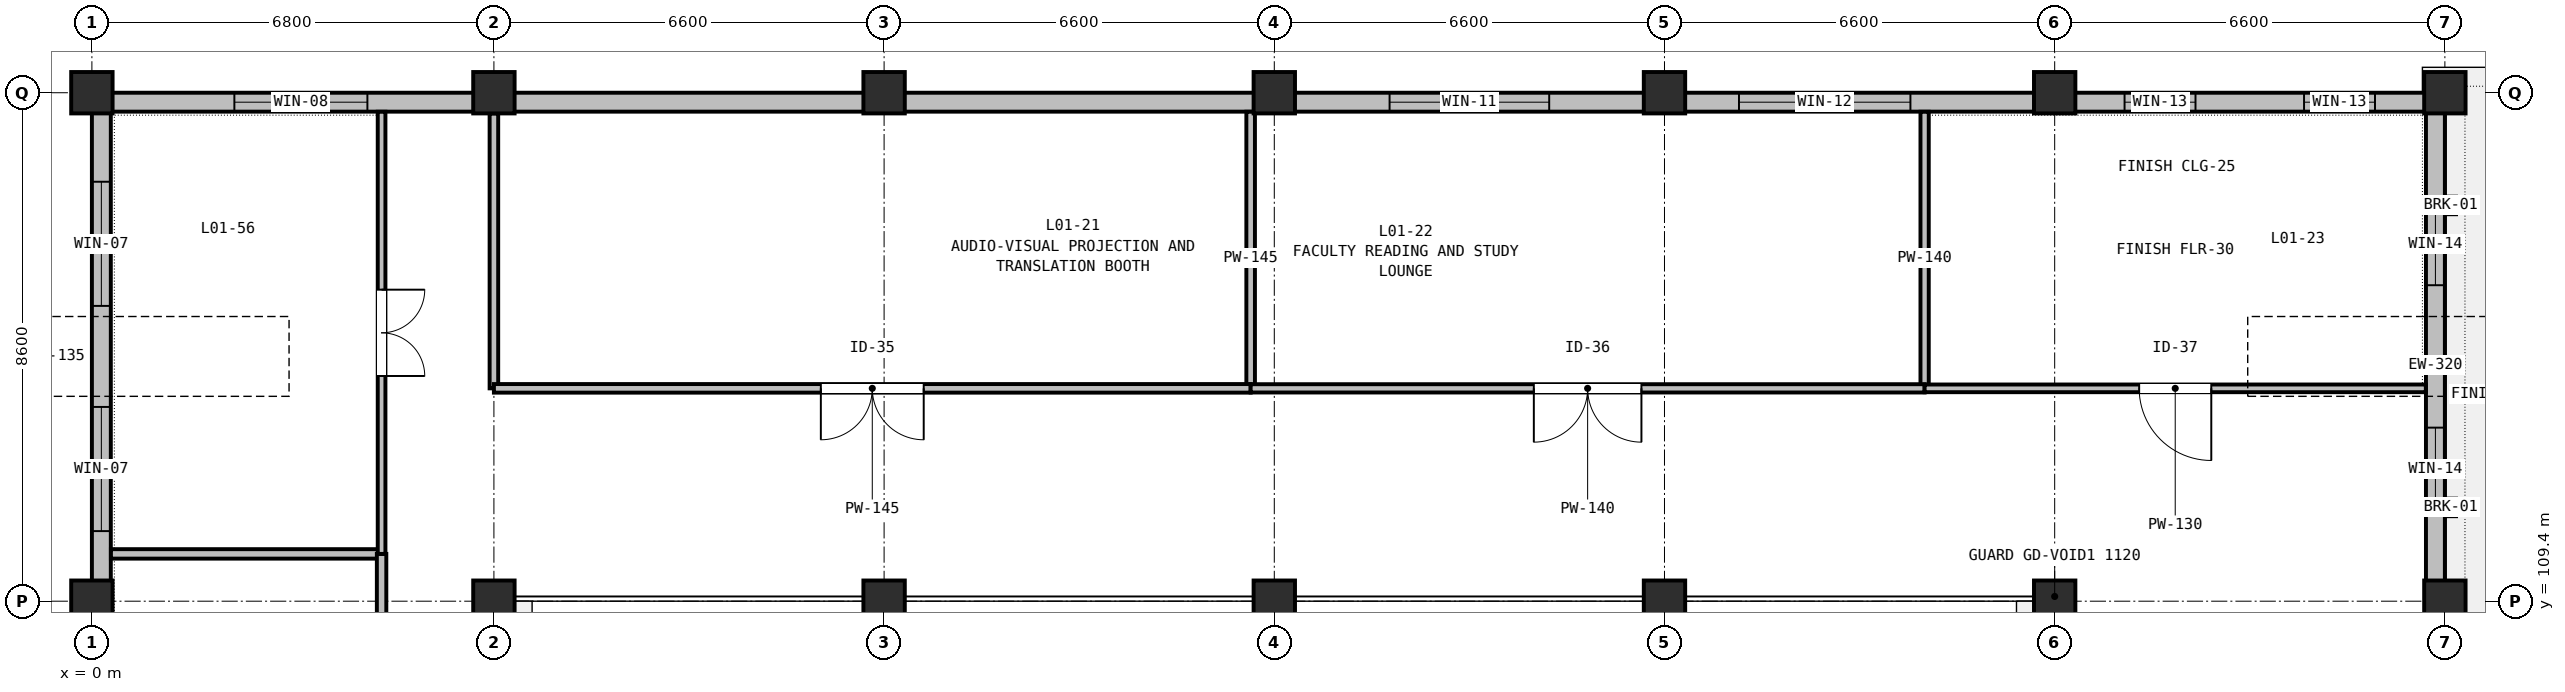
"""IFC4 building model, lengths in metres.
Left out: names, types, materials, properties, quantities, classifications, styles, units other than length and angle.
Written with IfcOpenShell. Run it as: python <this file> out.ifc"""

import sys

from ifc_helpers import new_model, si_unit, direction, frame, frame_2d, origin, origin_2d, place, context, subcontext, project, spatial, rectangle, extrude, element, fill, save


model = new_model("IFC4")
c1 = context("Model", 3, precision=1e-05, world=origin(), true_north=direction((0.0, 1.0)))
c2 = subcontext(c1, "Body", "Model", "MODEL_VIEW")
j1 = project(units=[si_unit("LENGTHUNIT", "METRE"), si_unit("PLANEANGLEUNIT", "RADIAN")], contexts=[c1])
p1 = place(None, origin())
s1 = spatial("IfcSite", under=j1, at=p1, CompositionType="ELEMENT")
p2 = place(p1, origin())
s2 = spatial("IfcBuilding", under=s1, at=p2, CompositionType="ELEMENT")
p3 = place(p2, frame((0.0, 0.0, 5.4)))
s3 = spatial("IfcBuildingStorey", under=s2, at=p3, CompositionType="ELEMENT", Elevation=5.4)
for number, where, z_axis, x_axis in (
    (1, (0.0, 109.4, 0.0), (0.0, 0.0, 1.0), (1.0, 0.0, 0.0)),
    (2, (0.0, 118.0, 0.0), (0.0, 0.0, 1.0), (1.0, 0.0, 0.0)),
    (3, (6.8, 109.4, 0.0), (0.0, 0.0, 1.0), (1.0, 0.0, 0.0)),
    (4, (6.8, 118.0, 0.0), (0.0, 0.0, 1.0), (1.0, 0.0, 0.0)),
    (5, (13.4, 109.4, 0.0), (0.0, 0.0, 1.0), (1.0, 0.0, 0.0)),
    (6, (13.4, 118.0, 0.0), (0.0, 0.0, 1.0), (1.0, 0.0, 0.0)),
    (7, (20.0, 109.4, 0.0), (0.0, 0.0, 1.0), (1.0, 0.0, 0.0)),
    (8, (20.0, 118.0, 0.0), (0.0, 0.0, 1.0), (1.0, 0.0, 0.0)),
    (9, (26.6, 109.4, 0.0), (0.0, 0.0, 1.0), (1.0, 0.0, 0.0)),
    (10, (26.6, 118.0, 0.0), (0.0, 0.0, 1.0), (1.0, 0.0, 0.0)),
    (11, (33.2, 109.4, 0.0), (0.0, 0.0, 1.0), (1.0, 0.0, 0.0)),
    (12, (33.2, 118.0, 0.0), (0.0, 0.0, 1.0), (1.0, 0.0, 0.0)),
    (13, (39.8, 109.4, 0.0), (0.0, 0.0, 1.0), (1.0, 0.0, 0.0)),
    (14, (39.8, 118.0, 0.0), (0.0, 0.0, 1.0), (1.0, 0.0, 0.0)),
):
    element("IfcColumn", number, at=place(p3, frame(where, z_axis=z_axis, x_axis=x_axis)), inside=s3, PredefinedType="COLUMN", context=c2, shape_type="SweptSolid", body=[
        extrude(rectangle(XDim=0.7, YDim=0.7, at=origin_2d()), origin(), (0.0, 0.0, 1.0), 4.74),
    ])
p4 = place(p3, frame((0.16, 101.0, 0.0), z_axis=(0.0, 0.0, 1.0), x_axis=(0.0, 1.0, 0.0)))
e15 = element("IfcWall", 15, at=p4, inside=s3, PredefinedType="STANDARD", context=c2, shape_type="SweptSolid", body=[
    extrude(rectangle(XDim=8.4, YDim=0.32, at=frame_2d((4.2, 0.0))), origin(), (0.0, 0.0, 1.0), 4.085),
])
p5 = place(p4, frame((1.293, 0.0, 0.9)))
e16 = element("IfcOpeningElement", 16, at=p5, cuts=e15, PredefinedType="OPENING", context=c2, shape_type="SweptSolid", body=[
    extrude(rectangle(XDim=1.95, YDim=2.1, at=frame_2d((0.975, 1.05))), frame((0.0, 0.17, 0.0), z_axis=(0.0, -1.0, 0.0), x_axis=(1.0, 0.0, 0.0)), (0.0, 0.0, 1.0), 0.34),
])
p6 = place(p4, frame((5.157, 0.0, 0.9)))
e17 = element("IfcOpeningElement", 17, at=p6, cuts=e15, PredefinedType="OPENING", context=c2, shape_type="SweptSolid", body=[
    extrude(rectangle(XDim=1.95, YDim=2.1, at=frame_2d((0.975, 1.05))), frame((0.0, 0.17, 0.0), z_axis=(0.0, -1.0, 0.0), x_axis=(1.0, 0.0, 0.0)), (0.0, 0.0, 1.0), 0.34),
])
p7 = place(p3, frame((0.16, 109.4, 0.0), z_axis=(0.0, 0.0, 1.0), x_axis=(0.0, 1.0, 0.0)))
e18 = element("IfcWall", 18, at=p7, inside=s3, PredefinedType="STANDARD", context=c2, shape_type="SweptSolid", body=[
    extrude(rectangle(XDim=8.28, YDim=0.32, at=frame_2d((4.14, 0.0))), origin(), (0.0, 0.0, 1.0), 4.085),
])
p8 = place(p7, frame((1.186, 0.0, 0.9)))
e19 = element("IfcOpeningElement", 19, at=p8, cuts=e18, PredefinedType="OPENING", context=c2, shape_type="SweptSolid", body=[
    extrude(rectangle(XDim=2.1, YDim=2.1, at=frame_2d((1.05, 1.05))), frame((0.0, 0.17, 0.0), z_axis=(0.0, -1.0, 0.0), x_axis=(1.0, 0.0, 0.0)), (0.0, 0.0, 1.0), 0.34),
])
p9 = place(p7, frame((4.994, 0.0, 0.9)))
e20 = element("IfcOpeningElement", 20, at=p9, cuts=e18, PredefinedType="OPENING", context=c2, shape_type="SweptSolid", body=[
    extrude(rectangle(XDim=2.1, YDim=2.1, at=frame_2d((1.05, 1.05))), frame((0.0, 0.17, 0.0), z_axis=(0.0, -1.0, 0.0), x_axis=(1.0, 0.0, 0.0)), (0.0, 0.0, 1.0), 0.34),
])
p10 = place(p3, frame((0.0, 117.84, 0.0), z_axis=(0.0, 0.0, 1.0), x_axis=(1.0, 0.0, 0.0)))
e21 = element("IfcWall", 21, at=p10, inside=s3, PredefinedType="STANDARD", context=c2, shape_type="SweptSolid", body=[
    extrude(rectangle(XDim=6.8, YDim=0.32, at=frame_2d((3.4, 0.0))), origin(), (0.0, 0.0, 1.0), 3.935),
])
p11 = place(p10, frame((2.41, 0.0, 0.9)))
e22 = element("IfcOpeningElement", 22, at=p11, cuts=e21, PredefinedType="OPENING", context=c2, shape_type="SweptSolid", body=[
    extrude(rectangle(XDim=2.25, YDim=2.1, at=frame_2d((1.125, 1.05))), frame((0.0, 0.17, 0.0), z_axis=(0.0, -1.0, 0.0), x_axis=(1.0, 0.0, 0.0)), (0.0, 0.0, 1.0), 0.34),
])
p12 = place(p3, frame((6.8, 117.84, 0.0), z_axis=(0.0, 0.0, 1.0), x_axis=(1.0, 0.0, 0.0)))
e23 = element("IfcWall", 23, at=p12, inside=s3, PredefinedType="STANDARD", context=c2, shape_type="SweptSolid", body=[
    extrude(rectangle(XDim=6.6, YDim=0.32, at=frame_2d((3.3, 0.0))), origin(), (0.0, 0.0, 1.0), 3.935),
])
p13 = place(p3, frame((13.4, 117.84, 0.0), z_axis=(0.0, 0.0, 1.0), x_axis=(1.0, 0.0, 0.0)))
e24 = element("IfcWall", 24, at=p13, inside=s3, PredefinedType="STANDARD", context=c2, shape_type="SweptSolid", body=[
    extrude(rectangle(XDim=6.6, YDim=0.32, at=frame_2d((3.3, 0.0))), origin(), (0.0, 0.0, 1.0), 3.935),
])
p14 = place(p3, frame((20.0, 117.84, 0.0), z_axis=(0.0, 0.0, 1.0), x_axis=(1.0, 0.0, 0.0)))
e25 = element("IfcWall", 25, at=p14, inside=s3, PredefinedType="STANDARD", context=c2, shape_type="SweptSolid", body=[
    extrude(rectangle(XDim=6.6, YDim=0.32, at=frame_2d((3.3, 0.0))), origin(), (0.0, 0.0, 1.0), 3.935),
])
p15 = place(p14, frame((1.95, 0.0, 0.75)))
e26 = element("IfcOpeningElement", 26, at=p15, cuts=e25, PredefinedType="OPENING", context=c2, shape_type="SweptSolid", body=[
    extrude(rectangle(XDim=2.7, YDim=2.2, at=frame_2d((1.35, 1.1))), frame((0.0, 0.17, 0.0), z_axis=(0.0, -1.0, 0.0), x_axis=(1.0, 0.0, 0.0)), (0.0, 0.0, 1.0), 0.34),
])
p16 = place(p3, frame((26.6, 117.84, 0.0), z_axis=(0.0, 0.0, 1.0), x_axis=(1.0, 0.0, 0.0)))
e27 = element("IfcWall", 27, at=p16, inside=s3, PredefinedType="STANDARD", context=c2, shape_type="SweptSolid", body=[
    extrude(rectangle(XDim=6.6, YDim=0.32, at=frame_2d((3.3, 0.0))), origin(), (0.0, 0.0, 1.0), 3.935),
])
p17 = place(p16, frame((1.26, 0.0, 0.75)))
e28 = element("IfcOpeningElement", 28, at=p17, cuts=e27, PredefinedType="OPENING", context=c2, shape_type="SweptSolid", body=[
    extrude(rectangle(XDim=2.9, YDim=2.2, at=frame_2d((1.45, 1.1))), frame((0.0, 0.17, 0.0), z_axis=(0.0, -1.0, 0.0), x_axis=(1.0, 0.0, 0.0)), (0.0, 0.0, 1.0), 0.34),
])
p18 = place(p3, frame((33.2, 117.84, 0.0), z_axis=(0.0, 0.0, 1.0), x_axis=(1.0, 0.0, 0.0)))
e29 = element("IfcWall", 29, at=p18, inside=s3, PredefinedType="STANDARD", context=c2, shape_type="SweptSolid", body=[
    extrude(rectangle(XDim=6.6, YDim=0.32, at=frame_2d((3.3, 0.0))), origin(), (0.0, 0.0, 1.0), 3.935),
])
p19 = place(p18, frame((1.182, 0.0, 0.9)))
e30 = element("IfcOpeningElement", 30, at=p19, cuts=e29, PredefinedType="OPENING", context=c2, shape_type="SweptSolid", body=[
    extrude(rectangle(XDim=1.2, YDim=1.5, at=frame_2d((0.6, 0.75))), frame((0.0, 0.17, 0.0), z_axis=(0.0, -1.0, 0.0), x_axis=(1.0, 0.0, 0.0)), (0.0, 0.0, 1.0), 0.34),
])
p20 = place(p18, frame((4.218, 0.0, 0.9)))
e31 = element("IfcOpeningElement", 31, at=p20, cuts=e29, PredefinedType="OPENING", context=c2, shape_type="SweptSolid", body=[
    extrude(rectangle(XDim=1.2, YDim=1.5, at=frame_2d((0.6, 0.75))), frame((0.0, 0.17, 0.0), z_axis=(0.0, -1.0, 0.0), x_axis=(1.0, 0.0, 0.0)), (0.0, 0.0, 1.0), 0.34),
])
p21 = place(p3, frame((39.64, 117.68, 0.0), z_axis=(0.0, 0.0, 1.0), x_axis=(0.0, -1.0, 0.0)))
e32 = element("IfcWall", 32, at=p21, inside=s3, PredefinedType="STANDARD", context=c2, shape_type="SweptSolid", body=[
    extrude(rectangle(XDim=8.28, YDim=0.32, at=frame_2d((4.14, 0.0))), origin(), (0.0, 0.0, 1.0), 4.085),
])
p22 = place(p21, frame((1.536, 0.0, 0.9)))
e33 = element("IfcOpeningElement", 33, at=p22, cuts=e32, PredefinedType="OPENING", context=c2, shape_type="SweptSolid", body=[
    extrude(rectangle(XDim=1.4, YDim=1.55, at=frame_2d((0.7, 0.775))), frame((0.0, 0.17, 0.0), z_axis=(0.0, -1.0, 0.0), x_axis=(1.0, 0.0, 0.0)), (0.0, 0.0, 1.0), 0.34),
])
p23 = place(p21, frame((5.344, 0.0, 0.9)))
e34 = element("IfcOpeningElement", 34, at=p23, cuts=e32, PredefinedType="OPENING", context=c2, shape_type="SweptSolid", body=[
    extrude(rectangle(XDim=1.4, YDim=1.55, at=frame_2d((0.7, 0.775))), frame((0.0, 0.17, 0.0), z_axis=(0.0, -1.0, 0.0), x_axis=(1.0, 0.0, 0.0)), (0.0, 0.0, 1.0), 0.34),
])
p24 = place(p3, frame((39.64, 109.4, 0.0), z_axis=(0.0, 0.0, 1.0), x_axis=(0.0, -1.0, 0.0)))
e35 = element("IfcWall", 35, at=p24, inside=s3, PredefinedType="STANDARD", context=c2, shape_type="SweptSolid", body=[
    extrude(rectangle(XDim=8.4, YDim=0.32, at=frame_2d((4.2, 0.0))), origin(), (0.0, 0.0, 1.0), 4.085),
])
p25 = place(p24, frame((1.468, 0.0, 0.9)))
e36 = element("IfcOpeningElement", 36, at=p25, cuts=e35, PredefinedType="OPENING", context=c2, shape_type="SweptSolid", body=[
    extrude(rectangle(XDim=1.6, YDim=1.6, at=frame_2d((0.8, 0.8))), frame((0.0, 0.17, 0.0), z_axis=(0.0, -1.0, 0.0), x_axis=(1.0, 0.0, 0.0)), (0.0, 0.0, 1.0), 0.34),
])
p26 = place(p24, frame((5.332, 0.0, 0.9)))
e37 = element("IfcOpeningElement", 37, at=p26, cuts=e35, PredefinedType="OPENING", context=c2, shape_type="SweptSolid", body=[
    extrude(rectangle(XDim=1.6, YDim=1.6, at=frame_2d((0.8, 0.8))), frame((0.0, 0.17, 0.0), z_axis=(0.0, -1.0, 0.0), x_axis=(1.0, 0.0, 0.0)), (0.0, 0.0, 1.0), 0.34),
])
p27 = place(p3, frame((39.57, 118.28, 0.0), z_axis=(0.0, 0.0, 1.0), x_axis=(1.0, 0.0, 0.0)))
e38 = element("IfcWall", 38, at=p27, inside=s3, PredefinedType="PARAPET", context=c2, shape_type="SweptSolid", body=[
    extrude(rectangle(XDim=6.2, YDim=0.22, at=frame_2d((3.1, 0.0))), origin(), (0.0, 0.0, 1.0), 0.68),
])
p28 = place(p3, frame((0.322, 110.2, 0.0), z_axis=(0.0, 0.0, 1.0), x_axis=(1.0, 0.0, 0.0)))
e39 = element("IfcWall", 39, at=p28, inside=s3, PredefinedType="PARTITIONING", context=c2, shape_type="SweptSolid", body=[
    extrude(rectangle(XDim=4.578, YDim=0.16, at=frame_2d((2.289, 0.0))), origin(), (0.0, 0.0, 1.0), 4.085),
])
p29 = place(p3, frame((4.9, 110.2, 0.0), z_axis=(0.0, 0.0, 1.0), x_axis=(0.0, -1.0, 0.0)))
e40 = element("IfcWall", 40, at=p29, inside=s3, PredefinedType="PARTITIONING", context=c2, shape_type="SweptSolid", body=[
    extrude(rectangle(XDim=17.8, YDim=0.16, at=frame_2d((8.9, 0.0))), origin(), (0.0, 0.0, 1.0), 4.135),
])
p30 = place(p29, frame((8.08, 0.0, 0.0)))
e41 = element("IfcOpeningElement", 41, at=p30, cuts=e40, PredefinedType="OPENING", context=c2, shape_type="SweptSolid", body=[
    extrude(rectangle(XDim=1.64, YDim=2.2, at=frame_2d((0.82, 1.1))), frame((0.0, 0.09, 0.0), z_axis=(0.0, -1.0, 0.0), x_axis=(1.0, 0.0, 0.0)), (0.0, 0.0, 1.0), 0.18),
])
p31 = place(p3, frame((6.8, 113.0, 0.0), z_axis=(0.0, 0.0, 1.0), x_axis=(0.0, 1.0, 0.0)))
e42 = element("IfcWall", 42, at=p31, inside=s3, PredefinedType="PARTITIONING", context=c2, shape_type="SweptSolid", body=[
    extrude(rectangle(XDim=4.65, YDim=0.145, at=frame_2d((2.325, 0.0))), origin(), (0.0, 0.0, 1.0), 3.935),
])
p32 = place(p3, frame((19.6, 117.678, 0.0), z_axis=(0.0, 0.0, 1.0), x_axis=(0.0, -1.0, 0.0)))
e43 = element("IfcWall", 43, at=p32, inside=s3, PredefinedType="PARTITIONING", context=c2, shape_type="SweptSolid", body=[
    extrude(rectangle(XDim=4.678, YDim=0.145, at=frame_2d((2.339, 0.0))), origin(), (0.0, 0.0, 1.0), 4.085),
])
p33 = place(p3, frame((19.6, 113.0, 0.0), z_axis=(0.0, 0.0, 1.0), x_axis=(-1.0, 0.0, 0.0)))
e44 = element("IfcWall", 44, at=p33, inside=s3, PredefinedType="PARTITIONING", context=c2, shape_type="SweptSolid", body=[
    extrude(rectangle(XDim=12.8, YDim=0.145, at=frame_2d((6.4, 0.0))), origin(), (0.0, 0.0, 1.0), 3.935),
])
p34 = place(p33, frame((5.53, 0.0, 0.0)))
e45 = element("IfcOpeningElement", 45, at=p34, cuts=e44, PredefinedType="OPENING", context=c2, shape_type="SweptSolid", body=[
    extrude(rectangle(XDim=1.74, YDim=2.2, at=frame_2d((0.87, 1.1))), frame((0.0, 0.083, 0.0), z_axis=(0.0, -1.0, 0.0), x_axis=(1.0, 0.0, 0.0)), (0.0, 0.0, 1.0), 0.165),
])
p35 = place(p3, frame((31.0, 117.678, 0.0), z_axis=(0.0, 0.0, 1.0), x_axis=(0.0, -1.0, 0.0)))
e46 = element("IfcWall", 46, at=p35, inside=s3, PredefinedType="PARTITIONING", context=c2, shape_type="SweptSolid", body=[
    extrude(rectangle(XDim=4.678, YDim=0.14, at=frame_2d((2.339, 0.0))), origin(), (0.0, 0.0, 1.0), 4.085),
])
p36 = place(p3, frame((31.0, 113.0, 0.0), z_axis=(0.0, 0.0, 1.0), x_axis=(-1.0, 0.0, 0.0)))
e47 = element("IfcWall", 47, at=p36, inside=s3, PredefinedType="PARTITIONING", context=c2, shape_type="SweptSolid", body=[
    extrude(rectangle(XDim=11.4, YDim=0.14, at=frame_2d((5.7, 0.0))), origin(), (0.0, 0.0, 1.0), 3.935),
])
p37 = place(p36, frame((4.79, 0.0, 0.0)))
e48 = element("IfcOpeningElement", 48, at=p37, cuts=e47, PredefinedType="OPENING", context=c2, shape_type="SweptSolid", body=[
    extrude(rectangle(XDim=1.82, YDim=2.2, at=frame_2d((0.91, 1.1))), frame((0.0, 0.08, 0.0), z_axis=(0.0, -1.0, 0.0), x_axis=(1.0, 0.0, 0.0)), (0.0, 0.0, 1.0), 0.16),
])
p38 = place(p3, frame((39.478, 113.0, 0.0), z_axis=(0.0, 0.0, 1.0), x_axis=(-1.0, 0.0, 0.0)))
e49 = element("IfcWall", 49, at=p38, inside=s3, PredefinedType="PARTITIONING", context=c2, shape_type="SweptSolid", body=[
    extrude(rectangle(XDim=8.478, YDim=0.13, at=frame_2d((4.239, 0.0))), origin(), (0.0, 0.0, 1.0), 3.935),
])
p39 = place(p38, frame((3.629, 0.0, 0.0)))
e50 = element("IfcOpeningElement", 50, at=p39, cuts=e49, PredefinedType="OPENING", context=c2, shape_type="SweptSolid", body=[
    extrude(rectangle(XDim=1.22, YDim=2.18, at=frame_2d((0.61, 1.09))), frame((0.0, 0.075, 0.0), z_axis=(0.0, -1.0, 0.0), x_axis=(1.0, 0.0, 0.0)), (0.0, 0.0, 1.0), 0.15),
])
p40 = place(p3, frame((4.9, 117.678, 0.0), z_axis=(0.0, 0.0, 1.0), x_axis=(0.0, -1.0, 0.0)))
e51 = element("IfcWall", 51, at=p40, inside=s3, PredefinedType="PARTITIONING", context=c2, shape_type="SweptSolid", body=[
    extrude(rectangle(XDim=7.478, YDim=0.13, at=frame_2d((3.739, 0.0))), origin(), (0.0, 0.0, 1.0), 4.085),
])
p41 = place(p40, frame((3.009, 0.0, 0.0)))
e52 = element("IfcOpeningElement", 52, at=p41, cuts=e51, PredefinedType="OPENING", context=c2, shape_type="SweptSolid", body=[
    extrude(rectangle(XDim=1.46, YDim=2.2, at=frame_2d((0.73, 1.1))), frame((0.0, 0.075, 0.0), z_axis=(0.0, -1.0, 0.0), x_axis=(1.0, 0.0, 0.0)), (0.0, 0.0, 1.0), 0.15),
])
p42 = place(p8, origin())
e53 = element("IfcWindow", 53, at=p42, inside=s3, PartitioningType="SINGLE_PANEL", PredefinedType="WINDOW", context=c2, shape_type="SweptSolid", body=[
    extrude(rectangle(XDim=2.1, YDim=2.1, at=frame_2d((1.05, 1.05))), frame((0.0, 0.03, 0.0), z_axis=(0.0, -1.0, 0.0), x_axis=(1.0, 0.0, 0.0)), (0.0, 0.0, 1.0), 0.06),
])
fill(e19, e53)
p43 = place(p9, origin())
e54 = element("IfcWindow", 54, at=p43, inside=s3, PartitioningType="SINGLE_PANEL", PredefinedType="WINDOW", context=c2, shape_type="SweptSolid", body=[
    extrude(rectangle(XDim=2.1, YDim=2.1, at=frame_2d((1.05, 1.05))), frame((0.0, 0.03, 0.0), z_axis=(0.0, -1.0, 0.0), x_axis=(1.0, 0.0, 0.0)), (0.0, 0.0, 1.0), 0.06),
])
fill(e20, e54)
p44 = place(p11, origin())
e55 = element("IfcWindow", 55, at=p44, inside=s3, PartitioningType="SINGLE_PANEL", PredefinedType="WINDOW", context=c2, shape_type="SweptSolid", body=[
    extrude(rectangle(XDim=2.25, YDim=2.1, at=frame_2d((1.125, 1.05))), frame((0.0, 0.03, 0.0), z_axis=(0.0, -1.0, 0.0), x_axis=(1.0, 0.0, 0.0)), (0.0, 0.0, 1.0), 0.06),
])
fill(e22, e55)
p45 = place(p15, origin())
e56 = element("IfcWindow", 56, at=p45, inside=s3, PartitioningType="SINGLE_PANEL", PredefinedType="WINDOW", context=c2, shape_type="SweptSolid", body=[
    extrude(rectangle(XDim=2.7, YDim=2.2, at=frame_2d((1.35, 1.1))), frame((0.0, 0.03, 0.0), z_axis=(0.0, -1.0, 0.0), x_axis=(1.0, 0.0, 0.0)), (0.0, 0.0, 1.0), 0.06),
])
fill(e26, e56)
p46 = place(p17, origin())
e57 = element("IfcWindow", 57, at=p46, inside=s3, PartitioningType="SINGLE_PANEL", PredefinedType="WINDOW", context=c2, shape_type="SweptSolid", body=[
    extrude(rectangle(XDim=2.9, YDim=2.2, at=frame_2d((1.45, 1.1))), frame((0.0, 0.03, 0.0), z_axis=(0.0, -1.0, 0.0), x_axis=(1.0, 0.0, 0.0)), (0.0, 0.0, 1.0), 0.06),
])
fill(e28, e57)
p47 = place(p19, origin())
e58 = element("IfcWindow", 58, at=p47, inside=s3, PartitioningType="SINGLE_PANEL", PredefinedType="WINDOW", context=c2, shape_type="SweptSolid", body=[
    extrude(rectangle(XDim=1.2, YDim=1.5, at=frame_2d((0.6, 0.75))), frame((0.0, 0.03, 0.0), z_axis=(0.0, -1.0, 0.0), x_axis=(1.0, 0.0, 0.0)), (0.0, 0.0, 1.0), 0.06),
])
fill(e30, e58)
p48 = place(p20, origin())
e59 = element("IfcWindow", 59, at=p48, inside=s3, PartitioningType="SINGLE_PANEL", PredefinedType="WINDOW", context=c2, shape_type="SweptSolid", body=[
    extrude(rectangle(XDim=1.2, YDim=1.5, at=frame_2d((0.6, 0.75))), frame((0.0, 0.03, 0.0), z_axis=(0.0, -1.0, 0.0), x_axis=(1.0, 0.0, 0.0)), (0.0, 0.0, 1.0), 0.06),
])
fill(e31, e59)
p49 = place(p22, origin())
e60 = element("IfcWindow", 60, at=p49, inside=s3, PartitioningType="SINGLE_PANEL", PredefinedType="WINDOW", context=c2, shape_type="SweptSolid", body=[
    extrude(rectangle(XDim=1.4, YDim=1.55, at=frame_2d((0.7, 0.775))), frame((0.0, 0.03, 0.0), z_axis=(0.0, -1.0, 0.0), x_axis=(1.0, 0.0, 0.0)), (0.0, 0.0, 1.0), 0.06),
])
fill(e33, e60)
p50 = place(p23, origin())
e61 = element("IfcWindow", 61, at=p50, inside=s3, PartitioningType="SINGLE_PANEL", PredefinedType="WINDOW", context=c2, shape_type="SweptSolid", body=[
    extrude(rectangle(XDim=1.4, YDim=1.55, at=frame_2d((0.7, 0.775))), frame((0.0, 0.03, 0.0), z_axis=(0.0, -1.0, 0.0), x_axis=(1.0, 0.0, 0.0)), (0.0, 0.0, 1.0), 0.06),
])
fill(e34, e61)
p51 = place(p34, origin())
e62 = element("IfcDoor", 62, at=p51, inside=s3, OperationType="DOUBLE_DOOR_SINGLE_SWING", PredefinedType="DOOR", context=c2, shape_type="SweptSolid", body=[
    extrude(rectangle(XDim=1.74, YDim=2.2, at=frame_2d((0.87, 1.1))), frame((0.0, 0.025, 0.0), z_axis=(0.0, -1.0, 0.0), x_axis=(1.0, 0.0, 0.0)), (0.0, 0.0, 1.0), 0.05),
])
fill(e45, e62)
p52 = place(p37, origin())
e63 = element("IfcDoor", 63, at=p52, inside=s3, OperationType="DOUBLE_DOOR_SINGLE_SWING", PredefinedType="DOOR", context=c2, shape_type="SweptSolid", body=[
    extrude(rectangle(XDim=1.82, YDim=2.2, at=frame_2d((0.91, 1.1))), frame((0.0, 0.025, 0.0), z_axis=(0.0, -1.0, 0.0), x_axis=(1.0, 0.0, 0.0)), (0.0, 0.0, 1.0), 0.05),
])
fill(e48, e63)
p53 = place(p39, origin())
e64 = element("IfcDoor", 64, at=p53, inside=s3, OperationType="SINGLE_SWING_LEFT", PredefinedType="DOOR", context=c2, shape_type="SweptSolid", body=[
    extrude(rectangle(XDim=1.22, YDim=2.18, at=frame_2d((0.61, 1.09))), frame((0.0, 0.025, 0.0), z_axis=(0.0, -1.0, 0.0), x_axis=(1.0, 0.0, 0.0)), (0.0, 0.0, 1.0), 0.05),
])
fill(e50, e64)
p54 = place(p41, origin())
e65 = element("IfcDoor", 65, at=p54, inside=s3, OperationType="DOUBLE_DOOR_SINGLE_SWING", PredefinedType="DOOR", context=c2, shape_type="SweptSolid", body=[
    extrude(rectangle(XDim=1.46, YDim=2.2, at=frame_2d((0.73, 1.1))), frame((0.0, 0.025, 0.0), z_axis=(0.0, -1.0, 0.0), x_axis=(1.0, 0.0, 0.0)), (0.0, 0.0, 1.0), 0.05),
])
fill(e52, e65)
save(model, sys.argv[1])
